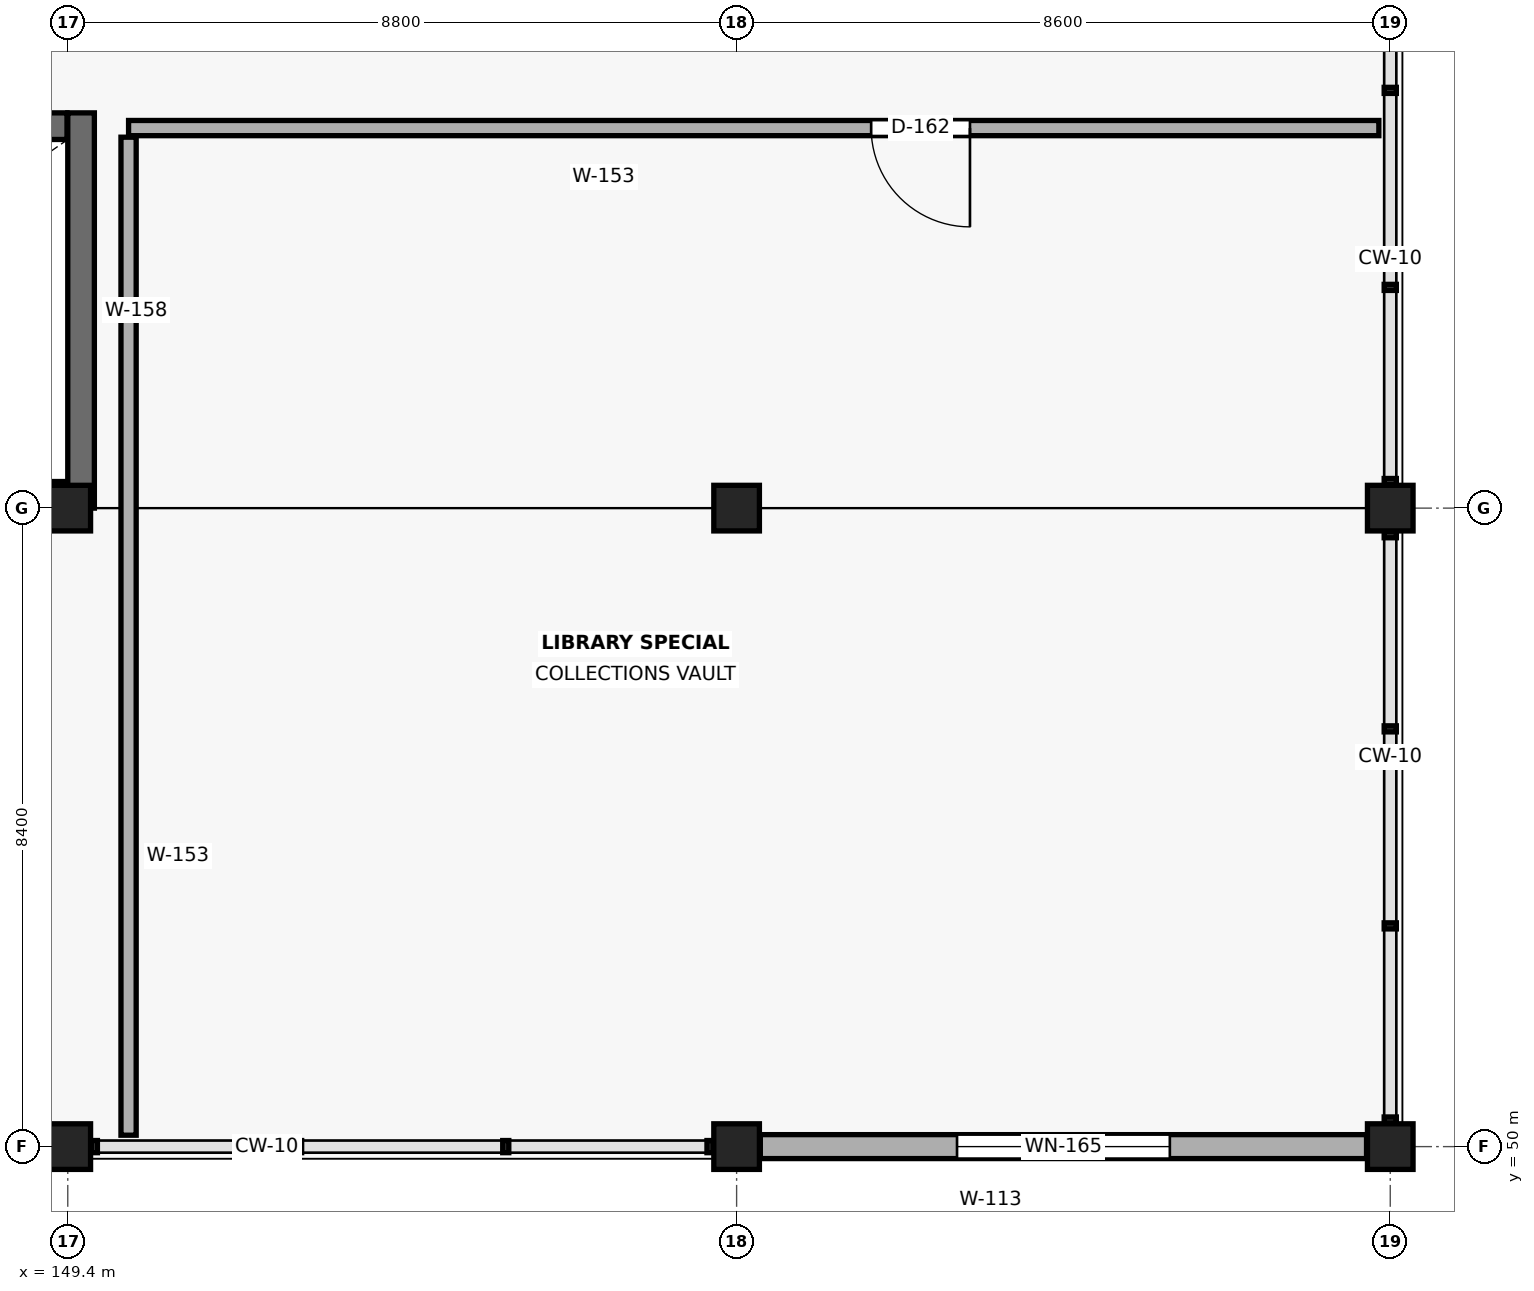
"""IFC4 building model, lengths in metres.
Left out: names, types, materials, properties, quantities, classifications, styles, units other than length and angle.
Written with IfcOpenShell. Run it as: python <this file> out.ifc"""

import sys

from ifc_helpers import new_model, si_unit, direction, frame, frame_2d, origin, origin_2d, place, context, subcontext, project, spatial, rectangle, extrude, element, fill, save


model = new_model("IFC4")
c1 = context("Model", 3, precision=1e-05, world=origin(), true_north=direction((0.0, 1.0)))
c2 = subcontext(c1, "Body", "Model", "MODEL_VIEW")
j1 = project(units=[si_unit("LENGTHUNIT", "METRE"), si_unit("PLANEANGLEUNIT", "RADIAN")], contexts=[c1])
p1 = place(None, origin())
s1 = spatial("IfcSite", under=j1, at=p1, CompositionType="ELEMENT")
p2 = place(p1, origin())
s2 = spatial("IfcBuilding", under=s1, at=p2, CompositionType="ELEMENT")
p3 = place(p2, frame((0.0, 0.0, 9.9)))
s3 = spatial("IfcBuildingStorey", under=s2, at=p3, CompositionType="ELEMENT", Elevation=9.9)
for number, where, z_axis, x_axis in (
    (1, (149.4, 50.0, 0.0), (0.0, 0.0, 1.0), (1.0, 0.0, 0.0)),
    (2, (149.4, 58.4, 0.0), (0.0, 0.0, 1.0), (1.0, 0.0, 0.0)),
    (3, (158.2, 50.0, 0.0), (0.0, 0.0, 1.0), (1.0, 0.0, 0.0)),
    (4, (158.2, 58.4, 0.0), (0.0, 0.0, 1.0), (1.0, 0.0, 0.0)),
    (5, (166.8, 50.0, 0.0), (0.0, 0.0, 1.0), (1.0, 0.0, 0.0)),
    (6, (166.8, 58.4, 0.0), (0.0, 0.0, 1.0), (1.0, 0.0, 0.0)),
):
    element("IfcColumn", number, at=place(p3, frame(where, z_axis=z_axis, x_axis=x_axis)), inside=s3, PredefinedType="COLUMN", context=c2, shape_type="SweptSolid", body=[
        extrude(rectangle(XDim=0.6, YDim=0.6, at=origin_2d()), origin(), (0.0, 0.0, 1.0), 4.5),
    ])
p4 = place(p3, frame((166.488, 50.0, 0.0), z_axis=(0.0, 0.0, 1.0), x_axis=(-1.0, 0.0, 0.0)))
e7 = element("IfcWall", 7, at=p4, inside=s3, PredefinedType="SOLIDWALL", context=c2, shape_type="SweptSolid", body=[
    extrude(rectangle(XDim=7.976, YDim=0.315, at=frame_2d((3.988, 0.0))), origin(), (0.0, 0.0, 1.0), 3.395),
])
p5 = place(p4, frame((2.588, 0.0, 0.85)))
e8 = element("IfcOpeningElement", 8, at=p5, cuts=e7, PredefinedType="OPENING", context=c2, shape_type="SweptSolid", body=[
    extrude(rectangle(XDim=2.8, YDim=2.45, at=frame_2d((1.4, 1.225))), frame((0.0, 0.169, 0.0), z_axis=(0.0, -1.0, 0.0), x_axis=(1.0, 0.0, 0.0)), (0.0, 0.0, 1.0), 0.339),
])
p6 = place(p3, frame((149.575, 58.4, 0.0), z_axis=(0.0, 0.0, 1.0), x_axis=(0.0, 1.0, 0.0)))
e9 = element("IfcWall", 9, at=p6, inside=s3, PredefinedType="SHEAR", context=c2, shape_type="SweptSolid", body=[
    extrude(rectangle(XDim=5.2, YDim=0.35, at=frame_2d((2.6, 0.0))), origin(), (0.0, 0.0, 1.0), 4.255),
])
for number, where, z_axis, x_axis in (
    (10, (141.21, 58.575, 0.0), (0.0, 0.0, 1.0), (1.0, 0.0, 0.0)),
    (11, (149.39, 63.425, 0.0), (0.0, 0.0, 1.0), (-1.0, 0.0, 0.0)),
):
    element("IfcWall", number, at=place(p3, frame(where, z_axis=z_axis, x_axis=x_axis)), inside=s3, PredefinedType="SHEAR", context=c2, shape_type="SweptSolid", body=[
        extrude(rectangle(XDim=8.18, YDim=0.35, at=frame_2d((4.09, 0.0))), origin(), (0.0, 0.0, 1.0), 4.255),
    ])
p7 = place(p3, frame((166.65, 63.4, 0.0), z_axis=(0.0, 0.0, 1.0), x_axis=(-1.0, 0.0, 0.0)))
e12 = element("IfcWall", 12, at=p7, inside=s3, PredefinedType="STANDARD", context=c2, shape_type="SweptSolid", body=[
    extrude(rectangle(XDim=16.45, YDim=0.2, at=frame_2d((8.225, 0.0))), origin(), (0.0, 0.0, 1.0), 4.255),
])
p8 = place(p7, frame((5.38, 0.0, 0.0)))
e13 = element("IfcOpeningElement", 13, at=p8, cuts=e12, PredefinedType="OPENING", context=c2, shape_type="SweptSolid", body=[
    extrude(rectangle(XDim=1.3, YDim=2.25, at=frame_2d((0.65, 1.125))), frame((0.0, 0.112, 0.0), z_axis=(0.0, -1.0, 0.0), x_axis=(1.0, 0.0, 0.0)), (0.0, 0.0, 1.0), 0.224),
])
p9 = place(p3, frame((150.2, 63.28, 0.0), z_axis=(0.0, 0.0, 1.0), x_axis=(0.0, -1.0, 0.0)))
e14 = element("IfcWall", 14, at=p9, inside=s3, PredefinedType="STANDARD", context=c2, shape_type="SweptSolid", body=[
    extrude(rectangle(XDim=13.13, YDim=0.2, at=frame_2d((6.565, 0.0))), origin(), (0.0, 0.0, 1.0), 4.255),
])
p10 = place(p5, origin())
e15 = element("IfcWindow", 15, at=p10, inside=s3, PartitioningType="SINGLE_PANEL", PredefinedType="WINDOW", context=c2, shape_type="SweptSolid", body=[
    extrude(rectangle(XDim=2.8, YDim=2.45, at=frame_2d((1.4, 1.225))), frame((0.0, 0.03, 0.0), z_axis=(0.0, -1.0, 0.0), x_axis=(1.0, 0.0, 0.0)), (0.0, 0.0, 1.0), 0.06),
])
fill(e8, e15)
p11 = place(p8, origin())
e16 = element("IfcDoor", 16, at=p11, inside=s3, OperationType="SINGLE_SWING_LEFT", PredefinedType="DOOR", context=c2, shape_type="SweptSolid", body=[
    extrude(rectangle(XDim=1.3, YDim=2.25, at=frame_2d((0.65, 1.125))), frame((0.0, 0.025, 0.0), z_axis=(0.0, -1.0, 0.0), x_axis=(1.0, 0.0, 0.0)), (0.0, 0.0, 1.0), 0.05),
])
fill(e13, e16)
save(model, sys.argv[1])
